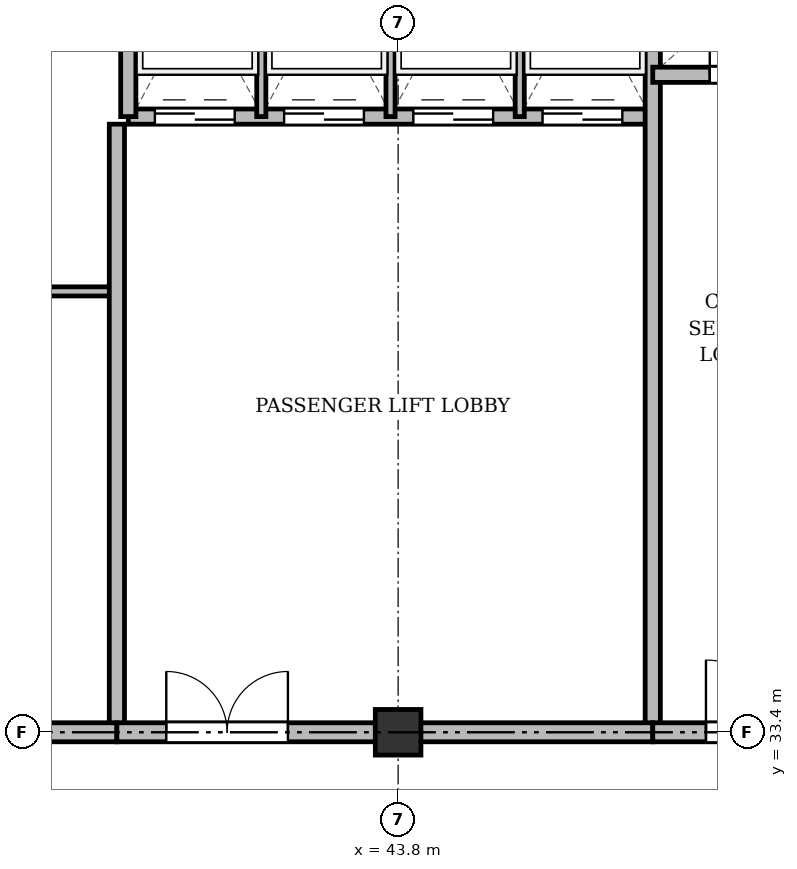
"""IFC4 building model, lengths in metres.
Left out: names, types, materials, properties, quantities, classifications, styles, units other than length and angle.
Written with IfcOpenShell. Run it as: python <this file> out.ifc"""

import sys

from ifc_helpers import new_model, si_unit, direction, frame, frame_2d, origin, origin_2d, place, context, subcontext, project, spatial, rectangle, extrude, source, transform, mapped, element, fill, save


model = new_model("IFC4")
c1 = context("Model", 3, precision=1e-05, world=origin(), true_north=direction((0.0, 1.0)))
c2 = subcontext(c1, "Body", "Model", "MODEL_VIEW")
j1 = project(units=[si_unit("LENGTHUNIT", "METRE"), si_unit("PLANEANGLEUNIT", "RADIAN")], contexts=[c1])
p1 = place(None, origin())
s1 = spatial("IfcSite", under=j1, at=p1, CompositionType="ELEMENT")
p2 = place(p1, origin())
s2 = spatial("IfcBuilding", under=s1, at=p2, CompositionType="ELEMENT")
p3 = place(p2, frame((0.0, 0.0, 288.3)))
s3 = spatial("IfcBuildingStorey", under=s2, at=p3, CompositionType="ELEMENT", Elevation=288.3)
m1 = source(origin(), c2, "Body", "SweptSolid", [
    extrude(rectangle(XDim=0.6, YDim=0.6, at=origin_2d()), origin(), (0.0, 0.0, 1.0), 3.6),
])
p4 = place(p3, frame((43.8, 33.4, 0.0), z_axis=(0.0, 0.0, 1.0), x_axis=(1.0, 0.0, 0.0)))
e1 = element("IfcColumn", 1, at=p4, inside=s3, PredefinedType="COLUMN", context=c2, shape_type="MappedRepresentation", body=[
    mapped(m1, transform((0.0, 0.0, 0.0), x_axis=(1.0, 0.0, 0.0), y_axis=(0.0, 1.0, 0.0), z_axis=(0.0, 0.0, 1.0), scale=1.0)),
])
p5 = place(p3, frame((33.3, 39.2, 0.0), z_axis=(0.0, 0.0, 1.0), x_axis=(1.0, 0.0, 0.0)))
e2 = element("IfcWall", 2, at=p5, inside=s3, PredefinedType="PARTITIONING", context=c2, shape_type="SweptSolid", body=[
    extrude(rectangle(XDim=6.8, YDim=0.12, at=frame_2d((3.4, 0.0))), origin(), (0.0, 0.0, 1.0), 3.37),
])
p6 = place(p5, frame((2.6, 0.0, 0.0)))
e3 = element("IfcOpeningElement", 3, at=p6, cuts=e2, PredefinedType="OPENING", context=c2, shape_type="SweptSolid", body=[
    extrude(rectangle(XDim=0.95, YDim=2.15, at=frame_2d((0.475, 1.075))), frame((0.0, 0.07, 0.0), z_axis=(0.0, -1.0, 0.0), x_axis=(1.0, 0.0, 0.0)), (0.0, 0.0, 1.0), 0.14),
])
p7 = place(p3, frame((40.1, 33.4, 0.0), z_axis=(0.0, 0.0, 1.0), x_axis=(0.0, 1.0, 0.0)))
e4 = element("IfcWall", 4, at=p7, inside=s3, PredefinedType="SOLIDWALL", context=c2, shape_type="SweptSolid", body=[
    extrude(rectangle(XDim=8.0, YDim=0.2, at=frame_2d((4.0, 0.0))), origin(), (0.0, 0.0, 1.0), 2.92),
])
p8 = place(p3, frame((40.25, 41.5, 0.0), z_axis=(0.0, 0.0, 1.0), x_axis=(1.0, 0.0, 0.0)))
e5 = element("IfcWall", 5, at=p8, inside=s3, PredefinedType="SOLIDWALL", context=c2, shape_type="SweptSolid", body=[
    extrude(rectangle(XDim=6.9, YDim=0.2, at=frame_2d((3.45, 0.0))), origin(), (0.0, 0.0, 1.0), 3.37),
])
p9 = place(p8, frame((0.35, 0.0, 0.0)))
e6 = element("IfcOpeningElement", 6, at=p9, cuts=e5, PredefinedType="OPENING", context=c2, shape_type="SweptSolid", body=[
    extrude(rectangle(XDim=1.05, YDim=2.15, at=frame_2d((0.525, 1.075))), frame((0.0, 0.11, 0.0), z_axis=(0.0, -1.0, 0.0), x_axis=(1.0, 0.0, 0.0)), (0.0, 0.0, 1.0), 0.22),
])
p10 = place(p8, frame((2.05, 0.0, 0.0)))
e7 = element("IfcOpeningElement", 7, at=p10, cuts=e5, PredefinedType="OPENING", context=c2, shape_type="SweptSolid", body=[
    extrude(rectangle(XDim=1.05, YDim=2.15, at=frame_2d((0.525, 1.075))), frame((0.0, 0.11, 0.0), z_axis=(0.0, -1.0, 0.0), x_axis=(1.0, 0.0, 0.0)), (0.0, 0.0, 1.0), 0.22),
])
p11 = place(p8, frame((3.75, 0.0, 0.0)))
e8 = element("IfcOpeningElement", 8, at=p11, cuts=e5, PredefinedType="OPENING", context=c2, shape_type="SweptSolid", body=[
    extrude(rectangle(XDim=1.05, YDim=2.15, at=frame_2d((0.525, 1.075))), frame((0.0, 0.11, 0.0), z_axis=(0.0, -1.0, 0.0), x_axis=(1.0, 0.0, 0.0)), (0.0, 0.0, 1.0), 0.22),
])
p12 = place(p8, frame((5.45, 0.0, 0.0)))
e9 = element("IfcOpeningElement", 9, at=p12, cuts=e5, PredefinedType="OPENING", context=c2, shape_type="SweptSolid", body=[
    extrude(rectangle(XDim=1.05, YDim=2.15, at=frame_2d((0.525, 1.075))), frame((0.0, 0.11, 0.0), z_axis=(0.0, -1.0, 0.0), x_axis=(1.0, 0.0, 0.0)), (0.0, 0.0, 1.0), 0.22),
])
p13 = place(p3, frame((40.25, 41.5, 0.0), z_axis=(0.0, 0.0, 1.0), x_axis=(0.0, 1.0, 0.0)))
e10 = element("IfcWall", 10, at=p13, inside=s3, PredefinedType="SOLIDWALL", context=c2, shape_type="SweptSolid", body=[
    extrude(rectangle(XDim=3.2, YDim=0.2, at=frame_2d((1.6, 0.0))), origin(), (0.0, 0.0, 1.0), 3.37),
])
for number, where, z_axis, x_axis in (
    (11, (42.0, 41.5, 0.0), (0.0, 0.0, 1.0), (0.0, 1.0, 0.0)),
    (12, (43.7, 41.5, 0.0), (0.0, 0.0, 1.0), (0.0, 1.0, 0.0)),
    (13, (45.4, 41.5, 0.0), (0.0, 0.0, 1.0), (0.0, 1.0, 0.0)),
):
    element("IfcWall", number, at=place(p3, frame(where, z_axis=z_axis, x_axis=x_axis)), inside=s3, PredefinedType="PARTITIONING", context=c2, shape_type="SweptSolid", body=[
        extrude(rectangle(XDim=3.2, YDim=0.12, at=frame_2d((1.6, 0.0))), origin(), (0.0, 0.0, 1.0), 3.37),
    ])
p14 = place(p3, frame((47.15, 33.4, 0.0), z_axis=(0.0, 0.0, 1.0), x_axis=(0.0, 1.0, 0.0)))
e14 = element("IfcWall", 14, at=p14, inside=s3, PredefinedType="SOLIDWALL", context=c2, shape_type="SweptSolid", body=[
    extrude(rectangle(XDim=11.3, YDim=0.2, at=frame_2d((5.65, 0.0))), origin(), (0.0, 0.0, 1.0), 2.92),
])
p15 = place(p3, frame((33.3, 33.4, 0.0), z_axis=(0.0, 0.0, 1.0), x_axis=(1.0, 0.0, 0.0)))
e15 = element("IfcWall", 15, at=p15, inside=s3, PredefinedType="PARTITIONING", context=c2, shape_type="SweptSolid", body=[
    extrude(rectangle(XDim=6.8, YDim=0.25, at=frame_2d((3.4, 0.0))), origin(), (0.0, 0.0, 1.0), 2.92),
])
p16 = place(p15, frame((2.4, 0.0, 0.0)))
e16 = element("IfcOpeningElement", 16, at=p16, cuts=e15, PredefinedType="OPENING", context=c2, shape_type="SweptSolid", body=[
    extrude(rectangle(XDim=1.0, YDim=2.15, at=frame_2d((0.5, 1.075))), frame((0.0, 0.135, 0.0), z_axis=(0.0, -1.0, 0.0), x_axis=(1.0, 0.0, 0.0)), (0.0, 0.0, 1.0), 0.27),
])
p17 = place(p3, frame((40.1, 33.4, 0.0), z_axis=(0.0, 0.0, 1.0), x_axis=(1.0, 0.0, 0.0)))
e17 = element("IfcWall", 17, at=p17, inside=s3, PredefinedType="PARTITIONING", context=c2, shape_type="SweptSolid", body=[
    extrude(rectangle(XDim=7.05, YDim=0.25, at=frame_2d((3.525, 0.0))), origin(), (0.0, 0.0, 1.0), 2.92),
])
p18 = place(p17, frame((0.65, 0.0, 0.0)))
e18 = element("IfcOpeningElement", 18, at=p18, cuts=e17, PredefinedType="OPENING", context=c2, shape_type="SweptSolid", body=[
    extrude(rectangle(XDim=1.6, YDim=2.2, at=frame_2d((0.8, 1.1))), frame((0.0, 0.135, 0.0), z_axis=(0.0, -1.0, 0.0), x_axis=(1.0, 0.0, 0.0)), (0.0, 0.0, 1.0), 0.27),
])
p19 = place(p3, frame((47.15, 42.05, 0.0), z_axis=(0.0, 0.0, 1.0), x_axis=(1.0, 0.0, 0.0)))
e19 = element("IfcWall", 19, at=p19, inside=s3, PredefinedType="SOLIDWALL", context=c2, shape_type="SweptSolid", body=[
    extrude(rectangle(XDim=7.85, YDim=0.2, at=frame_2d((3.925, 0.0))), origin(), (0.0, 0.0, 1.0), 2.87),
])
p20 = place(p19, frame((0.75, 0.0, 0.0)))
e20 = element("IfcOpeningElement", 20, at=p20, cuts=e19, PredefinedType="OPENING", context=c2, shape_type="SweptSolid", body=[
    extrude(rectangle(XDim=0.9, YDim=2.1, at=frame_2d((0.45, 1.05))), frame((0.0, 0.11, 0.0), z_axis=(0.0, -1.0, 0.0), x_axis=(1.0, 0.0, 0.0)), (0.0, 0.0, 1.0), 0.22),
])
p21 = place(p19, frame((3.85, 0.0, 0.0)))
e21 = element("IfcOpeningElement", 21, at=p21, cuts=e19, PredefinedType="OPENING", context=c2, shape_type="SweptSolid", body=[
    extrude(rectangle(XDim=0.9, YDim=2.1, at=frame_2d((0.45, 1.05))), frame((0.0, 0.11, 0.0), z_axis=(0.0, -1.0, 0.0), x_axis=(1.0, 0.0, 0.0)), (0.0, 0.0, 1.0), 0.22),
])
p22 = place(p3, frame((47.15, 33.4, 0.0), z_axis=(0.0, 0.0, 1.0), x_axis=(1.0, 0.0, 0.0)))
e22 = element("IfcWall", 22, at=p22, inside=s3, PredefinedType="PARTITIONING", context=c2, shape_type="SweptSolid", body=[
    extrude(rectangle(XDim=11.15, YDim=0.25, at=frame_2d((5.575, 0.0))), origin(), (0.0, 0.0, 1.0), 2.92),
])
p23 = place(p22, frame((0.7, 0.0, 0.0)))
e23 = element("IfcOpeningElement", 23, at=p23, cuts=e22, PredefinedType="OPENING", context=c2, shape_type="SweptSolid", body=[
    extrude(rectangle(XDim=0.95, YDim=2.15, at=frame_2d((0.475, 1.075))), frame((0.0, 0.135, 0.0), z_axis=(0.0, -1.0, 0.0), x_axis=(1.0, 0.0, 0.0)), (0.0, 0.0, 1.0), 0.27),
])
p24 = place(p22, frame((6.0, 0.0, 0.0)))
e24 = element("IfcOpeningElement", 24, at=p24, cuts=e22, PredefinedType="OPENING", context=c2, shape_type="SweptSolid", body=[
    extrude(rectangle(XDim=1.2, YDim=2.15, at=frame_2d((0.6, 1.075))), frame((0.0, 0.135, 0.0), z_axis=(0.0, -1.0, 0.0), x_axis=(1.0, 0.0, 0.0)), (0.0, 0.0, 1.0), 0.27),
])
m2 = source(origin(), c2, "Body", "SweptSolid", [
    extrude(rectangle(XDim=1.05, YDim=2.15, at=frame_2d((0.525, 1.075))), frame((0.0, 0.025, 0.0), z_axis=(0.0, -1.0, 0.0), x_axis=(1.0, 0.0, 0.0)), (0.0, 0.0, 1.0), 0.05),
])
p25 = place(p9, origin())
e25 = element("IfcDoor", 25, at=p25, inside=s3, OperationType="DOUBLE_DOOR_SLIDING", PredefinedType="DOOR", context=c2, shape_type="MappedRepresentation", body=[
    mapped(m2, transform((0.0, 0.0, 0.0), x_axis=(1.0, 0.0, 0.0), y_axis=(0.0, 1.0, 0.0), z_axis=(0.0, 0.0, 1.0), scale=1.0)),
])
fill(e6, e25)
p26 = place(p10, origin())
e26 = element("IfcDoor", 26, at=p26, inside=s3, OperationType="DOUBLE_DOOR_SLIDING", PredefinedType="DOOR", context=c2, shape_type="MappedRepresentation", body=[
    mapped(m2, transform((0.0, 0.0, 0.0), x_axis=(1.0, 0.0, 0.0), y_axis=(0.0, 1.0, 0.0), z_axis=(0.0, 0.0, 1.0), scale=1.0)),
])
fill(e7, e26)
p27 = place(p11, origin())
e27 = element("IfcDoor", 27, at=p27, inside=s3, OperationType="DOUBLE_DOOR_SLIDING", PredefinedType="DOOR", context=c2, shape_type="MappedRepresentation", body=[
    mapped(m2, transform((0.0, 0.0, 0.0), x_axis=(1.0, 0.0, 0.0), y_axis=(0.0, 1.0, 0.0), z_axis=(0.0, 0.0, 1.0), scale=1.0)),
])
fill(e8, e27)
p28 = place(p12, origin())
e28 = element("IfcDoor", 28, at=p28, inside=s3, OperationType="DOUBLE_DOOR_SLIDING", PredefinedType="DOOR", context=c2, shape_type="MappedRepresentation", body=[
    mapped(m2, transform((0.0, 0.0, 0.0), x_axis=(1.0, 0.0, 0.0), y_axis=(0.0, 1.0, 0.0), z_axis=(0.0, 0.0, 1.0), scale=1.0)),
])
fill(e9, e28)
m3 = source(origin(), c2, "Body", "SweptSolid", [
    extrude(rectangle(XDim=1.6, YDim=2.2, at=frame_2d((0.8, 1.1))), frame((0.0, 0.025, 0.0), z_axis=(0.0, -1.0, 0.0), x_axis=(1.0, 0.0, 0.0)), (0.0, 0.0, 1.0), 0.05),
])
p29 = place(p18, origin())
e29 = element("IfcDoor", 29, at=p29, inside=s3, OperationType="DOUBLE_DOOR_SINGLE_SWING", PredefinedType="DOOR", context=c2, shape_type="MappedRepresentation", body=[
    mapped(m3, transform((0.0, 0.0, 0.0), x_axis=(1.0, 0.0, 0.0), y_axis=(0.0, 1.0, 0.0), z_axis=(0.0, 0.0, 1.0), scale=1.0)),
])
fill(e18, e29)
m4 = source(origin(), c2, "Body", "SweptSolid", [
    extrude(rectangle(XDim=0.9, YDim=2.1, at=frame_2d((0.45, 1.05))), frame((0.0, 0.025, 0.0), z_axis=(0.0, -1.0, 0.0), x_axis=(1.0, 0.0, 0.0)), (0.0, 0.0, 1.0), 0.05),
])
p30 = place(p20, origin())
e30 = element("IfcDoor", 30, at=p30, inside=s3, OperationType="SINGLE_SWING_LEFT", PredefinedType="DOOR", context=c2, shape_type="MappedRepresentation", body=[
    mapped(m4, transform((0.0, 0.0, 0.0), x_axis=(1.0, 0.0, 0.0), y_axis=(0.0, 1.0, 0.0), z_axis=(0.0, 0.0, 1.0), scale=1.0)),
])
fill(e20, e30)
m5 = source(origin(), c2, "Body", "SweptSolid", [
    extrude(rectangle(XDim=0.95, YDim=2.15, at=frame_2d((0.475, 1.075))), frame((0.0, 0.025, 0.0), z_axis=(0.0, -1.0, 0.0), x_axis=(1.0, 0.0, 0.0)), (0.0, 0.0, 1.0), 0.05),
])
p31 = place(p23, origin())
e31 = element("IfcDoor", 31, at=p31, inside=s3, OperationType="SINGLE_SWING_LEFT", PredefinedType="DOOR", context=c2, shape_type="MappedRepresentation", body=[
    mapped(m5, transform((0.0, 0.0, 0.0), x_axis=(1.0, 0.0, 0.0), y_axis=(0.0, 1.0, 0.0), z_axis=(0.0, 0.0, 1.0), scale=1.0)),
])
fill(e23, e31)
save(model, sys.argv[1])
